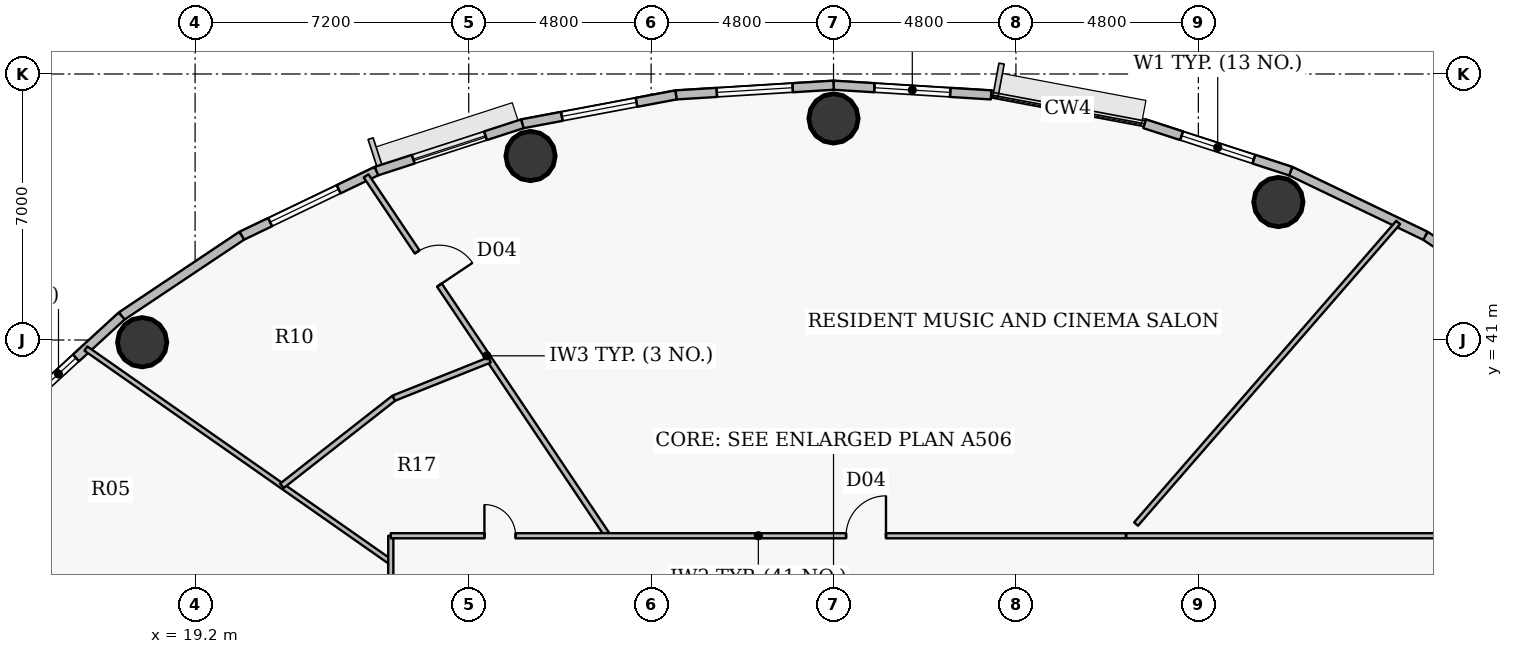
"""IFC4 building model, lengths in metres.
Left out: names, types, materials, properties, quantities, classifications, styles, units other than length and angle.
Written with IfcOpenShell. Run it as: python <this file> out.ifc"""

import sys

from ifc_helpers import new_model, si_unit, direction, frame, frame_2d, origin, origin_2d, place, context, subcontext, project, spatial, rectangle, hollow_circle, extrude, source, transform, mapped, element, fill, save


model = new_model("IFC4")
c1 = context("Model", 3, precision=1e-05, world=origin(), true_north=direction((0.0, 1.0)))
c2 = subcontext(c1, "Body", "Model", "MODEL_VIEW")
j1 = project(units=[si_unit("LENGTHUNIT", "METRE"), si_unit("PLANEANGLEUNIT", "RADIAN")], contexts=[c1])
p1 = place(None, origin())
s1 = spatial("IfcSite", under=j1, at=p1, CompositionType="ELEMENT")
p2 = place(p1, origin())
s2 = spatial("IfcBuilding", under=s1, at=p2, CompositionType="ELEMENT")
p3 = place(p2, frame((0.0, 0.0, 167.4)))
s3 = spatial("IfcBuildingStorey", under=s2, at=p3, CompositionType="ELEMENT", Elevation=167.4)
for number, where, z_axis, x_axis in (
    (1, (47.706, 44.631, 0.0), (0.0, 0.0, 1.0), (1.0, 0.0, 0.0)),
    (2, (36.0, 46.83, 0.0), (0.0, 0.0, 1.0), (1.0, 0.0, 0.0)),
    (3, (28.027, 45.841, 0.0), (0.0, 0.0, 1.0), (1.0, 0.0, 0.0)),
    (4, (17.808, 40.942, 0.0), (0.0, 0.0, 1.0), (1.0, 0.0, 0.0)),
):
    element("IfcColumn", number, at=place(p3, frame(where, z_axis=z_axis, x_axis=x_axis)), inside=s3, PredefinedType="COLUMN", context=c2, shape_type="SweptSolid", body=[
        extrude(hollow_circle(Radius=0.65, WallThickness=0.04, at=origin_2d()), origin(), (0.0, 0.0, 1.0), 3.75),
    ])
p4 = place(p3, frame((51.573, 43.743, 0.0), z_axis=(0.0, 0.0, 1.0), x_axis=(0.831228998277, -0.555930168657, 0.0)))
e5 = element("IfcWall", 5, at=p4, inside=s3, PredefinedType="SOLIDWALL", context=c2, shape_type="SweptSolid", body=[
    extrude(rectangle(XDim=3.8, YDim=0.24, at=frame_2d((1.9, 0.0))), origin(), (0.0, 0.0, 1.0), 3.5),
])
p5 = place(p3, frame((48.03, 45.444, 0.0), z_axis=(0.0, 0.0, 1.0), x_axis=(0.901564733809, -0.432644231155, 0.0)))
e6 = element("IfcWall", 6, at=p5, inside=s3, PredefinedType="SOLIDWALL", context=c2, shape_type="SweptSolid", body=[
    extrude(rectangle(XDim=3.93, YDim=0.24, at=frame_2d((1.965, 0.0))), origin(), (0.0, 0.0, 1.0), 3.5),
])
p6 = place(p3, frame((44.189, 46.689, 0.0), z_axis=(0.0, 0.0, 1.0), x_axis=(0.951209870236, -0.30854462038, 0.0)))
e7 = element("IfcWall", 7, at=p6, inside=s3, PredefinedType="SOLIDWALL", context=c2, shape_type="SweptSolid", body=[
    extrude(rectangle(XDim=4.038, YDim=0.24, at=frame_2d((2.019, 0.0))), origin(), (0.0, 0.0, 1.0), 3.5),
])
p7 = place(p6, frame((1.019, 0.0, 0.9)))
e8 = element("IfcOpeningElement", 8, at=p7, cuts=e7, PredefinedType="OPENING", context=c2, shape_type="SweptSolid", body=[
    extrude(rectangle(XDim=2.0, YDim=1.75, at=origin_2d()), frame((1.0, 0.13, 0.875), z_axis=(0.0, -1.0, 0.0), x_axis=(1.0, 0.0, 0.0)), (0.0, 0.0, 1.0), 0.26),
])
p8 = place(p3, frame((36.0, 47.705, 0.0), z_axis=(0.0, 0.0, 1.0), x_axis=(0.998104600619, -0.061540281305, 0.0)))
e9 = element("IfcWall", 9, at=p8, inside=s3, PredefinedType="SOLIDWALL", context=c2, shape_type="SweptSolid", body=[
    extrude(rectangle(XDim=4.154, YDim=0.24, at=frame_2d((2.077, 0.0))), origin(), (0.0, 0.0, 1.0), 3.5),
])
p9 = place(p8, frame((1.077, 0.0, 0.9)))
e10 = element("IfcOpeningElement", 10, at=p9, cuts=e9, PredefinedType="OPENING", context=c2, shape_type="SweptSolid", body=[
    extrude(rectangle(XDim=2.0, YDim=1.75, at=origin_2d()), frame((1.0, 0.13, 0.875), z_axis=(0.0, -1.0, 0.0), x_axis=(1.0, 0.0, 0.0)), (0.0, 0.0, 1.0), 0.26),
])
p10 = place(p3, frame((31.854, 47.449, 0.0), z_axis=(0.0, 0.0, 1.0), x_axis=(0.998104600619, 0.061540281305, 0.0)))
e11 = element("IfcWall", 11, at=p10, inside=s3, PredefinedType="SOLIDWALL", context=c2, shape_type="SweptSolid", body=[
    extrude(rectangle(XDim=4.154, YDim=0.24, at=frame_2d((2.077, 0.0))), origin(), (0.0, 0.0, 1.0), 3.5),
])
p11 = place(p10, frame((1.077, 0.0, 0.9)))
e12 = element("IfcOpeningElement", 12, at=p11, cuts=e11, PredefinedType="OPENING", context=c2, shape_type="SweptSolid", body=[
    extrude(rectangle(XDim=2.0, YDim=1.75, at=origin_2d()), frame((1.0, 0.13, 0.875), z_axis=(0.0, -1.0, 0.0), x_axis=(1.0, 0.0, 0.0)), (0.0, 0.0, 1.0), 0.26),
])
p12 = place(p3, frame((27.811, 46.689, 0.0), z_axis=(0.0, 0.0, 1.0), x_axis=(0.982788108205, 0.184736391573, 0.0)))
e13 = element("IfcWall", 13, at=p12, inside=s3, PredefinedType="SOLIDWALL", context=c2, shape_type="SweptSolid", body=[
    extrude(rectangle(XDim=4.114, YDim=0.24, at=frame_2d((2.057, 0.0))), origin(), (0.0, 0.0, 1.0), 3.5),
])
p13 = place(p12, frame((1.057, 0.0, 0.9)))
e14 = element("IfcOpeningElement", 14, at=p13, cuts=e13, PredefinedType="OPENING", context=c2, shape_type="SweptSolid", body=[
    extrude(rectangle(XDim=2.0, YDim=1.75, at=origin_2d()), frame((1.0, 0.13, 0.875), z_axis=(0.0, -1.0, 0.0), x_axis=(1.0, 0.0, 0.0)), (0.0, 0.0, 1.0), 0.26),
])
p14 = place(p3, frame((23.97, 45.444, 0.0), z_axis=(0.0, 0.0, 1.0), x_axis=(0.951209870236, 0.30854462038, 0.0)))
e15 = element("IfcWall", 15, at=p14, inside=s3, PredefinedType="SOLIDWALL", context=c2, shape_type="SweptSolid", body=[
    extrude(rectangle(XDim=4.038, YDim=0.24, at=frame_2d((2.019, 0.0))), origin(), (0.0, 0.0, 1.0), 3.5),
])
p15 = place(p14, frame((1.019, 0.0, 0.9)))
e16 = element("IfcOpeningElement", 16, at=p15, cuts=e15, PredefinedType="OPENING", context=c2, shape_type="SweptSolid", body=[
    extrude(rectangle(XDim=2.0, YDim=1.75, at=origin_2d()), frame((1.0, 0.13, 0.875), z_axis=(0.0, -1.0, 0.0), x_axis=(1.0, 0.0, 0.0)), (0.0, 0.0, 1.0), 0.26),
])
p16 = place(p3, frame((20.427, 43.743, 0.0), z_axis=(0.0, 0.0, 1.0), x_axis=(0.901564733809, 0.432644231155, 0.0)))
e17 = element("IfcWall", 17, at=p16, inside=s3, PredefinedType="SOLIDWALL", context=c2, shape_type="SweptSolid", body=[
    extrude(rectangle(XDim=3.93, YDim=0.24, at=frame_2d((1.965, 0.0))), origin(), (0.0, 0.0, 1.0), 3.5),
])
p17 = place(p16, frame((0.83, 0.0, 0.9)))
e18 = element("IfcOpeningElement", 18, at=p17, cuts=e17, PredefinedType="OPENING", context=c2, shape_type="SweptSolid", body=[
    extrude(rectangle(XDim=2.0, YDim=1.75, at=origin_2d()), frame((1.0, 0.13, 0.875), z_axis=(0.0, -1.0, 0.0), x_axis=(1.0, 0.0, 0.0)), (0.0, 0.0, 1.0), 0.26),
])
p18 = place(p3, frame((17.268, 41.631, 0.0), z_axis=(0.0, 0.0, 1.0), x_axis=(0.831228998277, 0.555930168657, 0.0)))
e19 = element("IfcWall", 19, at=p18, inside=s3, PredefinedType="SOLIDWALL", context=c2, shape_type="SweptSolid", body=[
    extrude(rectangle(XDim=3.8, YDim=0.24, at=frame_2d((1.9, 0.0))), origin(), (0.0, 0.0, 1.0), 3.5),
])
p19 = place(p3, frame((14.572, 39.158, 0.0), z_axis=(0.0, 0.0, 1.0), x_axis=(0.737076565834, 0.675809245349, 0.0)))
e20 = element("IfcWall", 20, at=p19, inside=s3, PredefinedType="SOLIDWALL", context=c2, shape_type="SweptSolid", body=[
    extrude(rectangle(XDim=3.658, YDim=0.24, at=frame_2d((1.829, 0.0))), origin(), (0.0, 0.0, 1.0), 3.5),
])
p20 = place(p19, frame((0.778, 0.0, 0.9)))
e21 = element("IfcOpeningElement", 21, at=p20, cuts=e20, PredefinedType="OPENING", context=c2, shape_type="SweptSolid", body=[
    extrude(rectangle(XDim=1.25, YDim=1.65, at=origin_2d()), frame((0.625, 0.13, 0.825), z_axis=(0.0, -1.0, 0.0), x_axis=(1.0, 0.0, 0.0)), (0.0, 0.0, 1.0), 0.26),
])
p21 = place(p3, frame((12.156, 35.93, 0.0), z_axis=(0.0, 0.0, 1.0), x_axis=(0.936480111121, -0.350720688689, 0.0)))
e22 = element("IfcWall", 22, at=p21, inside=s3, PredefinedType="PARTITIONING", context=c2, shape_type="SweptSolid", body=[
    extrude(rectangle(XDim=13.021, YDim=0.1, at=frame_2d((6.511, 0.0))), origin(), (0.0, 0.0, 1.0), 2.935),
])
p22 = place(p21, frame((6.061, 0.0, 0.0)))
e23 = element("IfcOpeningElement", 23, at=p22, cuts=e22, PredefinedType="OPENING", context=c2, shape_type="SweptSolid", body=[
    extrude(rectangle(XDim=0.9, YDim=2.1, at=origin_2d()), frame((0.45, 0.06, 1.05), z_axis=(0.0, -1.0, 0.0), x_axis=(1.0, 0.0, 0.0)), (0.0, 0.0, 1.0), 0.12),
])
p23 = place(p3, frame((16.327, 40.775, 0.0), z_axis=(0.0, 0.0, 1.0), x_axis=(0.819149932575, -0.573579452179, 0.0)))
e24 = element("IfcWall", 24, at=p23, inside=s3, PredefinedType="PARTITIONING", context=c2, shape_type="SweptSolid", body=[
    extrude(rectangle(XDim=9.794, YDim=0.135, at=frame_2d((4.897, 0.0))), origin(), (0.0, 0.0, 1.0), 2.935),
])
p24 = place(p3, frame((21.485, 37.164, 0.0), z_axis=(0.0, 0.0, 1.0), x_axis=(0.787295634213, 0.616575692311, 0.0)))
e25 = element("IfcWall", 25, at=p24, inside=s3, PredefinedType="PARTITIONING", context=c2, shape_type="SweptSolid", body=[
    extrude(rectangle(XDim=3.741, YDim=0.15, at=frame_2d((1.871, 0.0))), origin(), (0.0, 0.0, 1.0), 2.935),
])
p25 = place(p3, frame((23.699, 45.319, 0.0), z_axis=(0.0, 0.0, 1.0), x_axis=(0.557458426319, -0.830204856, 0.0)))
e26 = element("IfcWall", 26, at=p25, inside=s3, PredefinedType="PARTITIONING", context=c2, shape_type="SweptSolid", body=[
    extrude(rectangle(XDim=11.406, YDim=0.15, at=frame_2d((5.703, 0.0))), origin(), (0.0, 0.0, 1.0), 2.935),
])
p26 = place(p25, frame((2.412, 0.0, 0.0)))
e27 = element("IfcOpeningElement", 27, at=p26, cuts=e26, PredefinedType="OPENING", context=c2, shape_type="SweptSolid", body=[
    extrude(rectangle(XDim=1.05, YDim=2.15, at=origin_2d()), frame((0.525, 0.085, 1.075), z_axis=(0.0, -1.0, 0.0), x_axis=(1.0, 0.0, 0.0)), (0.0, 0.0, 1.0), 0.17),
])
p27 = place(p3, frame((24.35, 27.95, 0.0), z_axis=(0.0, 0.0, 1.0), x_axis=(0.0, 1.0, 0.0)))
e28 = element("IfcWall", 28, at=p27, inside=s3, PredefinedType="PARTITIONING", context=c2, shape_type="SweptSolid", body=[
    extrude(rectangle(XDim=7.9, YDim=0.135, at=frame_2d((3.95, 0.0))), origin(), (0.0, 0.0, 1.0), 2.935),
])
p28 = place(p3, frame((24.35, 35.85, 0.0), z_axis=(0.0, 0.0, 1.0), x_axis=(1.0, 0.0, 0.0)))
e29 = element("IfcWall", 29, at=p28, inside=s3, PredefinedType="PARTITIONING", context=c2, shape_type="SweptSolid", body=[
    extrude(rectangle(XDim=19.343, YDim=0.135, at=frame_2d((9.671, 0.0))), origin(), (0.0, 0.0, 1.0), 2.935),
])
p29 = place(p28, frame((11.98, 0.0, 0.0)))
e30 = element("IfcOpeningElement", 30, at=p29, cuts=e29, PredefinedType="OPENING", context=c2, shape_type="SweptSolid", body=[
    extrude(rectangle(XDim=1.05, YDim=2.15, at=origin_2d()), frame((0.525, 0.078, 1.075), z_axis=(0.0, -1.0, 0.0), x_axis=(1.0, 0.0, 0.0)), (0.0, 0.0, 1.0), 0.155),
])
p30 = place(p28, frame((2.464, 0.0, 0.0)))
e31 = element("IfcOpeningElement", 31, at=p30, cuts=e29, PredefinedType="OPENING", context=c2, shape_type="SweptSolid", body=[
    extrude(rectangle(XDim=0.82, YDim=2.1, at=origin_2d()), frame((0.41, 0.078, 1.05), z_axis=(0.0, -1.0, 0.0), x_axis=(1.0, 0.0, 0.0)), (0.0, 0.0, 1.0), 0.155),
])
p31 = place(p3, frame((24.43, 39.47, 0.0), z_axis=(0.0, 0.0, 1.0), x_axis=(0.928811262565, 0.370553152103, 0.0)))
e32 = element("IfcWall", 32, at=p31, inside=s3, PredefinedType="PARTITIONING", context=c2, shape_type="SweptSolid", body=[
    extrude(rectangle(XDim=2.715, YDim=0.15, at=frame_2d((1.357, 0.0))), origin(), (0.0, 0.0, 1.0), 3.5),
])
p32 = place(p3, frame((43.703, 35.85, 0.0), z_axis=(0.0, 0.0, 1.0), x_axis=(1.0, 0.0, 0.0)))
e33 = element("IfcWall", 33, at=p32, inside=s3, PredefinedType="PARTITIONING", context=c2, shape_type="SweptSolid", body=[
    extrude(rectangle(XDim=9.751, YDim=0.135, at=frame_2d((4.875, 0.0))), origin(), (0.0, 0.0, 1.0), 2.935),
])
p33 = place(p3, frame((50.858, 44.092, 0.0), z_axis=(0.0, 0.0, 1.0), x_axis=(-0.656061423317, -0.75470749886, 0.0)))
e34 = element("IfcWall", 34, at=p33, inside=s3, PredefinedType="PARTITIONING", context=c2, shape_type="SweptSolid", body=[
    extrude(rectangle(XDim=10.513, YDim=0.135, at=frame_2d((5.257, 0.0))), origin(), (0.0, 0.0, 1.0), 2.935),
])
m1 = source(origin(), c2, "Body", "SweptSolid", [
    extrude(rectangle(XDim=2.0, YDim=1.75, at=origin_2d()), frame((1.0, 0.03, 0.875), z_axis=(0.0, -1.0, 0.0), x_axis=(1.0, 0.0, 0.0)), (0.0, 0.0, 1.0), 0.06),
])
p34 = place(p7, origin())
e35 = element("IfcWindow", 35, at=p34, inside=s3, PartitioningType="DOUBLE_PANEL_VERTICAL", PredefinedType="WINDOW", context=c2, shape_type="MappedRepresentation", body=[
    mapped(m1, transform((0.0, 0.0, 0.0), x_axis=(1.0, 0.0, 0.0), y_axis=(0.0, 1.0, 0.0), z_axis=(0.0, 0.0, 1.0), scale=1.0)),
])
fill(e8, e35)
p35 = place(p9, origin())
e36 = element("IfcWindow", 36, at=p35, inside=s3, PartitioningType="DOUBLE_PANEL_VERTICAL", PredefinedType="WINDOW", context=c2, shape_type="MappedRepresentation", body=[
    mapped(m1, transform((0.0, 0.0, 0.0), x_axis=(1.0, 0.0, 0.0), y_axis=(0.0, 1.0, 0.0), z_axis=(0.0, 0.0, 1.0), scale=1.0)),
])
fill(e10, e36)
p36 = place(p11, origin())
e37 = element("IfcWindow", 37, at=p36, inside=s3, PartitioningType="DOUBLE_PANEL_VERTICAL", PredefinedType="WINDOW", context=c2, shape_type="MappedRepresentation", body=[
    mapped(m1, transform((0.0, 0.0, 0.0), x_axis=(1.0, 0.0, 0.0), y_axis=(0.0, 1.0, 0.0), z_axis=(0.0, 0.0, 1.0), scale=1.0)),
])
fill(e12, e37)
p37 = place(p13, origin())
e38 = element("IfcWindow", 38, at=p37, inside=s3, PartitioningType="DOUBLE_PANEL_VERTICAL", PredefinedType="WINDOW", context=c2, shape_type="MappedRepresentation", body=[
    mapped(m1, transform((0.0, 0.0, 0.0), x_axis=(1.0, 0.0, 0.0), y_axis=(0.0, 1.0, 0.0), z_axis=(0.0, 0.0, 1.0), scale=1.0)),
])
fill(e14, e38)
p38 = place(p15, origin())
e39 = element("IfcWindow", 39, at=p38, inside=s3, PartitioningType="DOUBLE_PANEL_VERTICAL", PredefinedType="WINDOW", context=c2, shape_type="MappedRepresentation", body=[
    mapped(m1, transform((0.0, 0.0, 0.0), x_axis=(1.0, 0.0, 0.0), y_axis=(0.0, 1.0, 0.0), z_axis=(0.0, 0.0, 1.0), scale=1.0)),
])
fill(e16, e39)
p39 = place(p17, origin())
e40 = element("IfcWindow", 40, at=p39, inside=s3, PartitioningType="DOUBLE_PANEL_VERTICAL", PredefinedType="WINDOW", context=c2, shape_type="MappedRepresentation", body=[
    mapped(m1, transform((0.0, 0.0, 0.0), x_axis=(1.0, 0.0, 0.0), y_axis=(0.0, 1.0, 0.0), z_axis=(0.0, 0.0, 1.0), scale=1.0)),
])
fill(e18, e40)
m2 = source(origin(), c2, "Body", "SweptSolid", [
    extrude(rectangle(XDim=1.25, YDim=1.65, at=origin_2d()), frame((0.625, 0.03, 0.825), z_axis=(0.0, -1.0, 0.0), x_axis=(1.0, 0.0, 0.0)), (0.0, 0.0, 1.0), 0.06),
])
p40 = place(p20, origin())
e41 = element("IfcWindow", 41, at=p40, inside=s3, PartitioningType="SINGLE_PANEL", PredefinedType="WINDOW", context=c2, shape_type="MappedRepresentation", body=[
    mapped(m2, transform((0.0, 0.0, 0.0), x_axis=(1.0, 0.0, 0.0), y_axis=(0.0, 1.0, 0.0), z_axis=(0.0, 0.0, 1.0), scale=1.0)),
])
fill(e21, e41)
m3 = source(origin(), c2, "Body", "SweptSolid", [
    extrude(rectangle(XDim=1.05, YDim=2.15, at=origin_2d()), frame((0.525, 0.025, 1.075), z_axis=(0.0, -1.0, 0.0), x_axis=(1.0, 0.0, 0.0)), (0.0, 0.0, 1.0), 0.05),
])
p41 = place(p29, origin())
e42 = element("IfcDoor", 42, at=p41, inside=s3, OperationType="SINGLE_SWING_RIGHT", PredefinedType="DOOR", context=c2, shape_type="MappedRepresentation", body=[
    mapped(m3, transform((0.0, 0.0, 0.0), x_axis=(1.0, 0.0, 0.0), y_axis=(0.0, 1.0, 0.0), z_axis=(0.0, 0.0, 1.0), scale=1.0)),
])
fill(e30, e42)
m4 = source(origin(), c2, "Body", "SweptSolid", [
    extrude(rectangle(XDim=0.82, YDim=2.1, at=origin_2d()), frame((0.41, 0.025, 1.05), z_axis=(0.0, -1.0, 0.0), x_axis=(1.0, 0.0, 0.0)), (0.0, 0.0, 1.0), 0.05),
])
p42 = place(p30, origin())
e43 = element("IfcDoor", 43, at=p42, inside=s3, OperationType="SINGLE_SWING_LEFT", PredefinedType="DOOR", context=c2, shape_type="MappedRepresentation", body=[
    mapped(m4, transform((0.0, 0.0, 0.0), x_axis=(1.0, 0.0, 0.0), y_axis=(0.0, 1.0, 0.0), z_axis=(0.0, 0.0, 1.0), scale=1.0)),
])
fill(e31, e43)
p43 = place(p26, origin())
e44 = element("IfcDoor", 44, at=p43, inside=s3, OperationType="SINGLE_SWING_RIGHT", PredefinedType="DOOR", context=c2, shape_type="MappedRepresentation", body=[
    mapped(m3, transform((0.0, 0.0, 0.0), x_axis=(1.0, 0.0, 0.0), y_axis=(0.0, 1.0, 0.0), z_axis=(0.0, 0.0, 1.0), scale=1.0)),
])
fill(e27, e44)
save(model, sys.argv[1])
